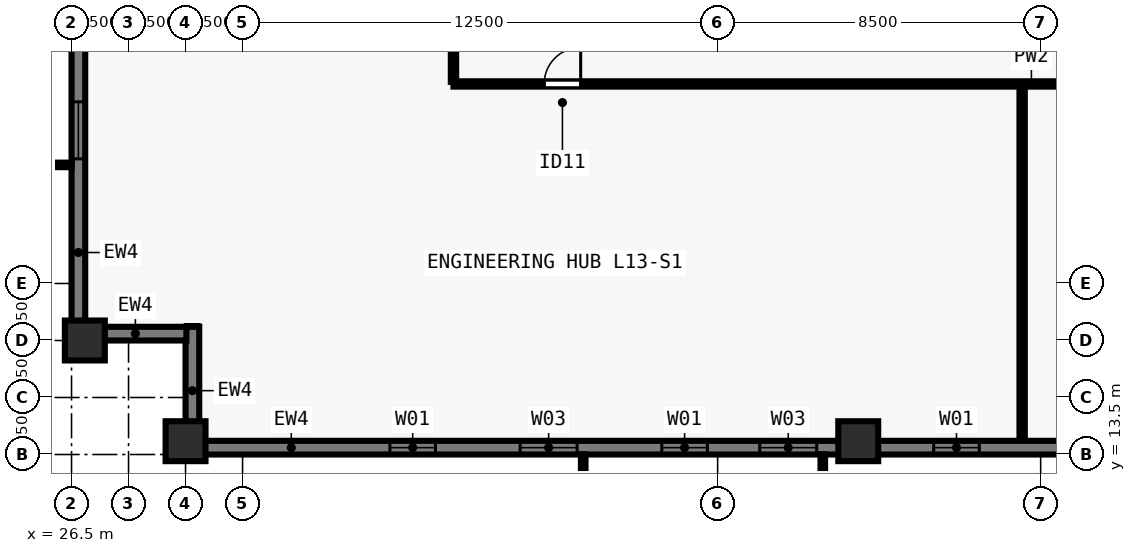
"""IFC4 building model, lengths in metres.
Left out: names, types, materials, properties, quantities, classifications, styles, units other than length and angle.
Written with IfcOpenShell. Run it as: python <this file> out.ifc"""

import sys

from ifc_helpers import new_model, si_unit, direction, frame, frame_2d, origin, origin_2d, place, context, subcontext, project, spatial, rectangle, extrude, element, fill, save


model = new_model("IFC4")
c1 = context("Model", 3, precision=1e-05, world=origin(), true_north=direction((0.0, 1.0)))
c2 = subcontext(c1, "Body", "Model", "MODEL_VIEW")
j1 = project(units=[si_unit("LENGTHUNIT", "METRE"), si_unit("PLANEANGLEUNIT", "RADIAN")], contexts=[c1])
p1 = place(None, origin())
s1 = spatial("IfcSite", under=j1, at=p1, CompositionType="ELEMENT")
p2 = place(p1, origin())
s2 = spatial("IfcBuilding", under=s1, at=p2, CompositionType="ELEMENT")
p3 = place(p2, frame((0.0, 0.0, 51.5)))
s3 = spatial("IfcBuildingStorey", under=s2, at=p3, CompositionType="ELEMENT", Elevation=51.5)
for number, where, z_axis, x_axis in (
    (1, (29.5, 13.85, 0.0), (0.0, 0.0, 1.0), (1.0, 0.0, 0.0)),
    (2, (47.2, 13.85, 0.0), (0.0, 0.0, 1.0), (1.0, 0.0, 0.0)),
    (3, (26.85, 16.5, 0.0), (0.0, 0.0, 1.0), (0.0, 1.0, 0.0)),
):
    element("IfcColumn", number, at=place(p3, frame(where, z_axis=z_axis, x_axis=x_axis)), inside=s3, PredefinedType="COLUMN", context=c2, shape_type="SweptSolid", body=[
        extrude(rectangle(XDim=1.05, YDim=1.05, at=origin_2d()), origin(), (0.0, 0.0, 1.0), 3.5),
    ])
p4 = place(p3, frame((59.0, 13.68, 0.0), z_axis=(0.0, 0.0, 1.0), x_axis=(-1.0, 0.0, 0.0)))
e4 = element("IfcWall", 4, at=p4, inside=s3, PredefinedType="SOLIDWALL", context=c2, shape_type="SweptSolid", body=[
    extrude(rectangle(XDim=29.162, YDim=0.36, at=frame_2d((14.581, 0.0))), origin(), (0.0, 0.0, 1.0), 3.28),
])
p5 = place(p4, frame((4.888, 0.0, 0.8)))
e5 = element("IfcOpeningElement", 5, at=p5, cuts=e4, PredefinedType="OPENING", context=c2, shape_type="SweptSolid", body=[
    extrude(rectangle(XDim=1.5, YDim=1.544, at=frame_2d((0.75, 0.772))), frame((0.0, 0.19, 0.0), z_axis=(0.0, -1.0, 0.0), x_axis=(1.0, 0.0, 0.0)), (0.0, 0.0, 1.0), 0.38),
])
p6 = place(p4, frame((8.615, 0.0, 0.8)))
e6 = element("IfcOpeningElement", 6, at=p6, cuts=e4, PredefinedType="OPENING", context=c2, shape_type="SweptSolid", body=[
    extrude(rectangle(XDim=1.2, YDim=1.544, at=frame_2d((0.6, 0.772))), frame((0.0, 0.19, 0.0), z_axis=(0.0, -1.0, 0.0), x_axis=(1.0, 0.0, 0.0)), (0.0, 0.0, 1.0), 0.38),
])
p7 = place(p4, frame((12.893, 0.0, 0.8)))
e7 = element("IfcOpeningElement", 7, at=p7, cuts=e4, PredefinedType="OPENING", context=c2, shape_type="SweptSolid", body=[
    extrude(rectangle(XDim=1.5, YDim=1.544, at=frame_2d((0.75, 0.772))), frame((0.0, 0.19, 0.0), z_axis=(0.0, -1.0, 0.0), x_axis=(1.0, 0.0, 0.0)), (0.0, 0.0, 1.0), 0.38),
])
p8 = place(p4, frame((15.77, 0.0, 0.8)))
e8 = element("IfcOpeningElement", 8, at=p8, cuts=e4, PredefinedType="OPENING", context=c2, shape_type="SweptSolid", body=[
    extrude(rectangle(XDim=1.2, YDim=1.544, at=frame_2d((0.6, 0.772))), frame((0.0, 0.19, 0.0), z_axis=(0.0, -1.0, 0.0), x_axis=(1.0, 0.0, 0.0)), (0.0, 0.0, 1.0), 0.38),
])
p9 = place(p4, frame((19.197, 0.0, 0.8)))
e9 = element("IfcOpeningElement", 9, at=p9, cuts=e4, PredefinedType="OPENING", context=c2, shape_type="SweptSolid", body=[
    extrude(rectangle(XDim=1.5, YDim=1.544, at=frame_2d((0.75, 0.772))), frame((0.0, 0.19, 0.0), z_axis=(0.0, -1.0, 0.0), x_axis=(1.0, 0.0, 0.0)), (0.0, 0.0, 1.0), 0.38),
])
p10 = place(p4, frame((22.924, 0.0, 0.8)))
e10 = element("IfcOpeningElement", 10, at=p10, cuts=e4, PredefinedType="OPENING", context=c2, shape_type="SweptSolid", body=[
    extrude(rectangle(XDim=1.2, YDim=1.544, at=frame_2d((0.6, 0.772))), frame((0.0, 0.19, 0.0), z_axis=(0.0, -1.0, 0.0), x_axis=(1.0, 0.0, 0.0)), (0.0, 0.0, 1.0), 0.38),
])
p11 = place(p3, frame((29.68, 13.5, 0.0), z_axis=(0.0, 0.0, 1.0), x_axis=(0.0, 1.0, 0.0)))
e11 = element("IfcWall", 11, at=p11, inside=s3, PredefinedType="SOLIDWALL", context=c2, shape_type="SweptSolid", body=[
    extrude(rectangle(XDim=3.36, YDim=0.36, at=frame_2d((1.68, 0.0))), origin(), (0.0, 0.0, 1.0), 3.28),
])
p12 = place(p3, frame((29.522, 16.68, 0.0), z_axis=(0.0, 0.0, 1.0), x_axis=(-1.0, 0.0, 0.0)))
e12 = element("IfcWall", 12, at=p12, inside=s3, PredefinedType="SOLIDWALL", context=c2, shape_type="SweptSolid", body=[
    extrude(rectangle(XDim=2.684, YDim=0.36, at=frame_2d((1.342, 0.0))), origin(), (0.0, 0.0, 1.0), 3.28),
])
p13 = place(p3, frame((26.68, 16.5, 0.0), z_axis=(0.0, 0.0, 1.0), x_axis=(0.0, 1.0, 0.0)))
e13 = element("IfcWall", 13, at=p13, inside=s3, PredefinedType="SOLIDWALL", context=c2, shape_type="SweptSolid", body=[
    extrude(rectangle(XDim=44.662, YDim=0.36, at=frame_2d((22.331, 0.0))), origin(), (0.0, 0.0, 1.0), 3.28),
])
p14 = place(p13, frame((4.78, 0.0, 0.8)))
e14 = element("IfcOpeningElement", 14, at=p14, cuts=e13, PredefinedType="OPENING", context=c2, shape_type="SweptSolid", body=[
    extrude(rectangle(XDim=1.5, YDim=1.544, at=frame_2d((0.75, 0.772))), frame((0.0, 0.19, 0.0), z_axis=(0.0, -1.0, 0.0), x_axis=(1.0, 0.0, 0.0)), (0.0, 0.0, 1.0), 0.38),
])
p15 = place(p13, frame((8.29, 0.0, 0.8)))
e15 = element("IfcOpeningElement", 15, at=p15, cuts=e13, PredefinedType="OPENING", context=c2, shape_type="SweptSolid", body=[
    extrude(rectangle(XDim=1.2, YDim=1.544, at=frame_2d((0.6, 0.772))), frame((0.0, 0.19, 0.0), z_axis=(0.0, -1.0, 0.0), x_axis=(1.0, 0.0, 0.0)), (0.0, 0.0, 1.0), 0.38),
])
p16 = place(p13, frame((11.5, 0.0, 0.8)))
e16 = element("IfcOpeningElement", 16, at=p16, cuts=e13, PredefinedType="OPENING", context=c2, shape_type="SweptSolid", body=[
    extrude(rectangle(XDim=1.5, YDim=1.544, at=frame_2d((0.75, 0.772))), frame((0.0, 0.19, 0.0), z_axis=(0.0, -1.0, 0.0), x_axis=(1.0, 0.0, 0.0)), (0.0, 0.0, 1.0), 0.38),
])
p17 = place(p13, frame((15.01, 0.0, 0.8)))
e17 = element("IfcOpeningElement", 17, at=p17, cuts=e13, PredefinedType="OPENING", context=c2, shape_type="SweptSolid", body=[
    extrude(rectangle(XDim=1.2, YDim=1.544, at=frame_2d((0.6, 0.772))), frame((0.0, 0.19, 0.0), z_axis=(0.0, -1.0, 0.0), x_axis=(1.0, 0.0, 0.0)), (0.0, 0.0, 1.0), 0.38),
])
p18 = place(p13, frame((18.671, 0.0, 0.8)))
e18 = element("IfcOpeningElement", 18, at=p18, cuts=e13, PredefinedType="OPENING", context=c2, shape_type="SweptSolid", body=[
    extrude(rectangle(XDim=1.5, YDim=1.544, at=frame_2d((0.75, 0.772))), frame((0.0, 0.19, 0.0), z_axis=(0.0, -1.0, 0.0), x_axis=(1.0, 0.0, 0.0)), (0.0, 0.0, 1.0), 0.38),
])
p19 = place(p13, frame((20.881, 0.0, 0.8)))
e19 = element("IfcOpeningElement", 19, at=p19, cuts=e13, PredefinedType="OPENING", context=c2, shape_type="SweptSolid", body=[
    extrude(rectangle(XDim=1.2, YDim=1.544, at=frame_2d((0.6, 0.772))), frame((0.0, 0.19, 0.0), z_axis=(0.0, -1.0, 0.0), x_axis=(1.0, 0.0, 0.0)), (0.0, 0.0, 1.0), 0.38),
])
p20 = place(p13, frame((24.941, 0.0, 0.8)))
e20 = element("IfcOpeningElement", 20, at=p20, cuts=e13, PredefinedType="OPENING", context=c2, shape_type="SweptSolid", body=[
    extrude(rectangle(XDim=1.5, YDim=1.544, at=frame_2d((0.75, 0.772))), frame((0.0, 0.19, 0.0), z_axis=(0.0, -1.0, 0.0), x_axis=(1.0, 0.0, 0.0)), (0.0, 0.0, 1.0), 0.38),
])
p21 = place(p13, frame((28.451, 0.0, 0.8)))
e21 = element("IfcOpeningElement", 21, at=p21, cuts=e13, PredefinedType="OPENING", context=c2, shape_type="SweptSolid", body=[
    extrude(rectangle(XDim=1.2, YDim=1.544, at=frame_2d((0.6, 0.772))), frame((0.0, 0.19, 0.0), z_axis=(0.0, -1.0, 0.0), x_axis=(1.0, 0.0, 0.0)), (0.0, 0.0, 1.0), 0.38),
])
p22 = place(p13, frame((31.662, 0.0, 0.8)))
e22 = element("IfcOpeningElement", 22, at=p22, cuts=e13, PredefinedType="OPENING", context=c2, shape_type="SweptSolid", body=[
    extrude(rectangle(XDim=1.5, YDim=1.544, at=frame_2d((0.75, 0.772))), frame((0.0, 0.19, 0.0), z_axis=(0.0, -1.0, 0.0), x_axis=(1.0, 0.0, 0.0)), (0.0, 0.0, 1.0), 0.38),
])
p23 = place(p13, frame((35.172, 0.0, 0.8)))
e23 = element("IfcOpeningElement", 23, at=p23, cuts=e13, PredefinedType="OPENING", context=c2, shape_type="SweptSolid", body=[
    extrude(rectangle(XDim=1.2, YDim=1.544, at=frame_2d((0.6, 0.772))), frame((0.0, 0.19, 0.0), z_axis=(0.0, -1.0, 0.0), x_axis=(1.0, 0.0, 0.0)), (0.0, 0.0, 1.0), 0.38),
])
p24 = place(p13, frame((38.382, 0.0, 0.8)))
e24 = element("IfcOpeningElement", 24, at=p24, cuts=e13, PredefinedType="OPENING", context=c2, shape_type="SweptSolid", body=[
    extrude(rectangle(XDim=1.5, YDim=1.544, at=frame_2d((0.75, 0.772))), frame((0.0, 0.19, 0.0), z_axis=(0.0, -1.0, 0.0), x_axis=(1.0, 0.0, 0.0)), (0.0, 0.0, 1.0), 0.38),
])
p25 = place(p3, frame((36.55, 23.25, 0.0), z_axis=(0.0, 0.0, 1.0), x_axis=(1.0, 0.0, 0.0)))
e25 = element("IfcWall", 25, at=p25, inside=s3, PredefinedType="PARTITIONING", context=c2, shape_type="SweptSolid", body=[
    extrude(rectangle(XDim=30.9, YDim=0.14, at=frame_2d((15.45, 0.0))), origin(), (0.0, 0.0, 1.0), 3.28),
])
p26 = place(p25, frame((2.386, 0.0, 0.0)))
e26 = element("IfcOpeningElement", 26, at=p26, cuts=e25, PredefinedType="OPENING", context=c2, shape_type="SweptSolid", body=[
    extrude(rectangle(XDim=0.96, YDim=2.12, at=frame_2d((0.48, 1.06))), frame((0.0, 0.08, 0.0), z_axis=(0.0, -1.0, 0.0), x_axis=(1.0, 0.0, 0.0)), (0.0, 0.0, 1.0), 0.16),
])
p27 = place(p25, frame((27.066, 0.0, 0.0)))
e27 = element("IfcOpeningElement", 27, at=p27, cuts=e25, PredefinedType="OPENING", context=c2, shape_type="SweptSolid", body=[
    extrude(rectangle(XDim=0.96, YDim=2.12, at=frame_2d((0.48, 1.06))), frame((0.0, 0.08, 0.0), z_axis=(0.0, -1.0, 0.0), x_axis=(1.0, 0.0, 0.0)), (0.0, 0.0, 1.0), 0.16),
])
p28 = place(p3, frame((36.55, 23.305, 0.0), z_axis=(0.0, 0.0, 1.0), x_axis=(0.0, 1.0, 0.0)))
e28 = element("IfcWall", 28, at=p28, inside=s3, PredefinedType="PARTITIONING", context=c2, shape_type="SweptSolid", body=[
    extrude(rectangle(XDim=31.39, YDim=0.14, at=frame_2d((15.695, 0.0))), origin(), (0.0, 0.0, 1.0), 3.28),
])
p29 = place(p28, frame((3.307, 0.0, 0.0)))
e29 = element("IfcOpeningElement", 29, at=p29, cuts=e28, PredefinedType="OPENING", context=c2, shape_type="SweptSolid", body=[
    extrude(rectangle(XDim=0.96, YDim=2.12, at=frame_2d((0.48, 1.06))), frame((0.0, 0.08, 0.0), z_axis=(0.0, -1.0, 0.0), x_axis=(1.0, 0.0, 0.0)), (0.0, 0.0, 1.0), 0.16),
])
p30 = place(p28, frame((11.25, 0.0, 0.0)))
e30 = element("IfcOpeningElement", 30, at=p30, cuts=e28, PredefinedType="OPENING", context=c2, shape_type="SweptSolid", body=[
    extrude(rectangle(XDim=0.96, YDim=2.12, at=frame_2d((0.48, 1.06))), frame((0.0, 0.08, 0.0), z_axis=(0.0, -1.0, 0.0), x_axis=(1.0, 0.0, 0.0)), (0.0, 0.0, 1.0), 0.16),
])
p31 = place(p28, frame((19.075, 0.0, 0.0)))
e31 = element("IfcOpeningElement", 31, at=p31, cuts=e28, PredefinedType="OPENING", context=c2, shape_type="SweptSolid", body=[
    extrude(rectangle(XDim=0.96, YDim=2.12, at=frame_2d((0.48, 1.06))), frame((0.0, 0.08, 0.0), z_axis=(0.0, -1.0, 0.0), x_axis=(1.0, 0.0, 0.0)), (0.0, 0.0, 1.0), 0.16),
])
p32 = place(p28, frame((26.782, 0.0, 0.0)))
e32 = element("IfcOpeningElement", 32, at=p32, cuts=e28, PredefinedType="OPENING", context=c2, shape_type="SweptSolid", body=[
    extrude(rectangle(XDim=0.96, YDim=2.12, at=frame_2d((0.48, 1.06))), frame((0.0, 0.08, 0.0), z_axis=(0.0, -1.0, 0.0), x_axis=(1.0, 0.0, 0.0)), (0.0, 0.0, 1.0), 0.16),
])
p33 = place(p3, frame((51.512, 13.92, 0.0), z_axis=(0.0, 0.0, 1.0), x_axis=(0.0, 1.0, 0.0)))
e33 = element("IfcWall", 33, at=p33, inside=s3, PredefinedType="PARTITIONING", context=c2, shape_type="SweptSolid", body=[
    extrude(rectangle(XDim=9.23, YDim=0.14, at=frame_2d((4.615, 0.0))), origin(), (0.0, 0.0, 1.0), 2.849),
])
p34 = place(p6, origin())
e34 = element("IfcWindow", 34, at=p34, inside=s3, PartitioningType="SINGLE_PANEL", PredefinedType="WINDOW", context=c2, shape_type="SweptSolid", body=[
    extrude(rectangle(XDim=1.2, YDim=1.544, at=frame_2d((0.6, 0.772))), frame((0.0, -0.05, 0.0), z_axis=(0.0, -1.0, 0.0), x_axis=(1.0, 0.0, 0.0)), (0.0, 0.0, 1.0), 0.06),
])
fill(e6, e34)
p35 = place(p7, origin())
e35 = element("IfcWindow", 35, at=p35, inside=s3, PartitioningType="SINGLE_PANEL", PredefinedType="WINDOW", context=c2, shape_type="SweptSolid", body=[
    extrude(rectangle(XDim=1.5, YDim=1.544, at=frame_2d((0.75, 0.772))), frame((0.0, -0.05, 0.0), z_axis=(0.0, -1.0, 0.0), x_axis=(1.0, 0.0, 0.0)), (0.0, 0.0, 1.0), 0.06),
])
fill(e7, e35)
p36 = place(p8, origin())
e36 = element("IfcWindow", 36, at=p36, inside=s3, PartitioningType="SINGLE_PANEL", PredefinedType="WINDOW", context=c2, shape_type="SweptSolid", body=[
    extrude(rectangle(XDim=1.2, YDim=1.544, at=frame_2d((0.6, 0.772))), frame((0.0, -0.05, 0.0), z_axis=(0.0, -1.0, 0.0), x_axis=(1.0, 0.0, 0.0)), (0.0, 0.0, 1.0), 0.06),
])
fill(e8, e36)
p37 = place(p9, origin())
e37 = element("IfcWindow", 37, at=p37, inside=s3, PartitioningType="SINGLE_PANEL", PredefinedType="WINDOW", context=c2, shape_type="SweptSolid", body=[
    extrude(rectangle(XDim=1.5, YDim=1.544, at=frame_2d((0.75, 0.772))), frame((0.0, -0.05, 0.0), z_axis=(0.0, -1.0, 0.0), x_axis=(1.0, 0.0, 0.0)), (0.0, 0.0, 1.0), 0.06),
])
fill(e9, e37)
p38 = place(p10, origin())
e38 = element("IfcWindow", 38, at=p38, inside=s3, PartitioningType="SINGLE_PANEL", PredefinedType="WINDOW", context=c2, shape_type="SweptSolid", body=[
    extrude(rectangle(XDim=1.2, YDim=1.544, at=frame_2d((0.6, 0.772))), frame((0.0, -0.05, 0.0), z_axis=(0.0, -1.0, 0.0), x_axis=(1.0, 0.0, 0.0)), (0.0, 0.0, 1.0), 0.06),
])
fill(e10, e38)
p39 = place(p14, origin())
e39 = element("IfcWindow", 39, at=p39, inside=s3, PartitioningType="SINGLE_PANEL", PredefinedType="WINDOW", context=c2, shape_type="SweptSolid", body=[
    extrude(rectangle(XDim=1.5, YDim=1.544, at=frame_2d((0.75, 0.772))), frame((0.0, -0.05, 0.0), z_axis=(0.0, -1.0, 0.0), x_axis=(1.0, 0.0, 0.0)), (0.0, 0.0, 1.0), 0.06),
])
fill(e14, e39)
p40 = place(p26, origin())
e40 = element("IfcDoor", 40, at=p40, inside=s3, OperationType="SINGLE_SWING_RIGHT", PredefinedType="DOOR", context=c2, shape_type="SweptSolid", body=[
    extrude(rectangle(XDim=0.96, YDim=2.12, at=frame_2d((0.48, 1.06))), frame((0.0, 0.025, 0.0), z_axis=(0.0, -1.0, 0.0), x_axis=(1.0, 0.0, 0.0)), (0.0, 0.0, 1.0), 0.05),
])
fill(e26, e40)
save(model, sys.argv[1])
